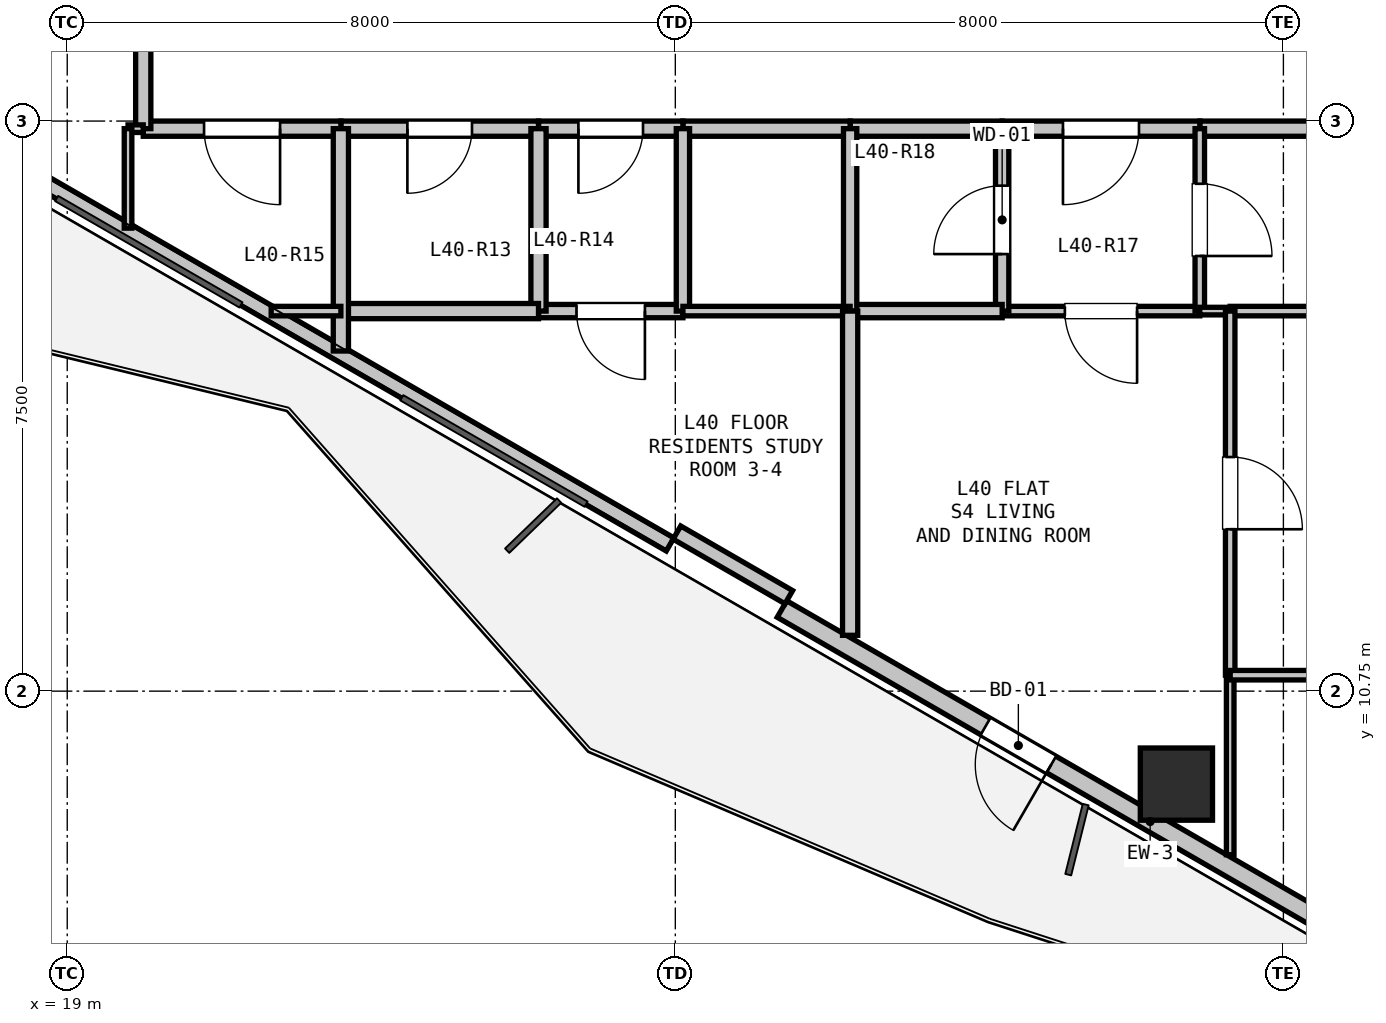
"""IFC4 building model, lengths in metres.
Left out: names, types, materials, properties, quantities, classifications, styles, units other than length and angle.
Written with IfcOpenShell. Run it as: python <this file> out.ifc"""

import sys

from ifc_helpers import new_model, si_unit, direction, frame, frame_2d, origin, origin_2d, place, context, subcontext, project, spatial, rectangle, hollow_rectangle, extrude, element, fill, save


model = new_model("IFC4")
c1 = context("Model", 3, precision=1e-05, world=origin(), true_north=direction((0.0, 1.0)))
c2 = subcontext(c1, "Body", "Model", "MODEL_VIEW")
j1 = project(units=[si_unit("LENGTHUNIT", "METRE"), si_unit("PLANEANGLEUNIT", "RADIAN")], contexts=[c1])
p1 = place(None, origin())
s1 = spatial("IfcSite", under=j1, at=p1, CompositionType="ELEMENT")
p2 = place(p1, origin())
s2 = spatial("IfcBuilding", under=s1, at=p2, CompositionType="ELEMENT")
p3 = place(p2, frame((0.0, 0.0, 144.3)))
s3 = spatial("IfcBuildingStorey", under=s2, at=p3, CompositionType="ELEMENT", Elevation=144.3)
p4 = place(p3, frame((33.593, 9.527, 0.0), z_axis=(0.0, 0.0, 1.0), x_axis=(1.0, 0.0, 0.0)))
e1 = element("IfcColumn", 1, at=p4, inside=s3, PredefinedType="COLUMN", context=c2, shape_type="SweptSolid", body=[
    extrude(hollow_rectangle(XDim=0.95, YDim=0.95, WallThickness=0.028, at=origin_2d()), origin(), (0.0, 0.0, 1.0), 3.3),
])
p5 = place(p3, frame((38.091, 6.237, 0.0), z_axis=(0.0, 0.0, 1.0), x_axis=(-0.86602239209, 0.500005216371, 0.0)))
e2 = element("IfcWall", 2, at=p5, inside=s3, PredefinedType="SOLIDWALL", context=c2, shape_type="SweptSolid", body=[
    extrude(rectangle(XDim=11.186, YDim=0.25, at=frame_2d((5.593, 0.0))), origin(), (0.0, 0.0, 1.0), 2.68),
])
p6 = place(p5, frame((7.095, 0.0, 0.0)))
e3 = element("IfcOpeningElement", 3, at=p6, cuts=e2, PredefinedType="OPENING", context=c2, shape_type="SweptSolid", body=[
    extrude(rectangle(XDim=1.0, YDim=2.1, at=frame_2d((0.5, 1.05))), frame((0.0, 0.135, 0.0), z_axis=(0.0, -1.0, 0.0), x_axis=(1.0, 0.0, 0.0)), (0.0, 0.0, 1.0), 0.27),
])
p7 = place(p5, frame((1.718, 0.0, 0.9)))
e4 = element("IfcOpeningElement", 4, at=p7, cuts=e2, PredefinedType="OPENING", context=c2, shape_type="SweptSolid", body=[
    extrude(rectangle(XDim=1.2, YDim=1.4, at=frame_2d((0.6, 0.7))), frame((0.0, 0.135, 0.0), z_axis=(0.0, -1.0, 0.0), x_axis=(1.0, 0.0, 0.0)), (0.0, 0.0, 1.0), 0.27),
])
p8 = place(p3, frame((26.931, 12.68, 0.0), z_axis=(0.0, 0.0, 1.0), x_axis=(-0.866026619769, 0.499997893847, 0.0)))
e5 = element("IfcWall", 5, at=p8, inside=s3, PredefinedType="PARAPET", context=c2, shape_type="SweptSolid", body=[
    extrude(rectangle(XDim=10.486, YDim=0.2, at=frame_2d((5.243, 0.0))), origin(), (0.0, 0.0, 1.0), 0.2),
])
p9 = place(p3, frame((28.493, 11.986, 0.0), z_axis=(0.0, 0.0, 1.0), x_axis=(-0.86605165483, 0.499954529098, 0.0)))
e6 = element("IfcWall", 6, at=p9, inside=s3, PredefinedType="PARAPET", context=c2, shape_type="SweptSolid", body=[
    extrude(rectangle(XDim=1.7, YDim=0.2, at=frame_2d((0.85, 0.0))), origin(), (0.0, 0.0, 1.0), 2.68),
])
p10 = place(p3, frame((39.2, 18.15, 0.0), z_axis=(0.0, 0.0, 1.0), x_axis=(-1.0, 0.0, 0.0)))
e7 = element("IfcWall", 7, at=p10, inside=s3, PredefinedType="PARTITIONING", context=c2, shape_type="SweptSolid", body=[
    extrude(rectangle(XDim=5.3, YDim=0.2, at=frame_2d((2.65, 0.0))), origin(), (0.0, 0.0, 1.0), 2.433),
])
p11 = place(p3, frame((33.9, 18.15, 0.0), z_axis=(0.0, 0.0, 1.0), x_axis=(-1.0, 0.0, 0.0)))
e8 = element("IfcWall", 8, at=p11, inside=s3, PredefinedType="PARTITIONING", context=c2, shape_type="SweptSolid", body=[
    extrude(rectangle(XDim=2.6, YDim=0.2, at=frame_2d((1.3, 0.0))), origin(), (0.0, 0.0, 1.0), 3.06),
])
p12 = place(p11, frame((0.8, 0.0, 0.0)))
e9 = element("IfcOpeningElement", 9, at=p12, cuts=e8, PredefinedType="OPENING", context=c2, shape_type="SweptSolid", body=[
    extrude(rectangle(XDim=1.0, YDim=2.15, at=frame_2d((0.5, 1.075))), frame((0.0, 0.11, 0.0), z_axis=(0.0, -1.0, 0.0), x_axis=(1.0, 0.0, 0.0)), (0.0, 0.0, 1.0), 0.22),
])
p13 = place(p3, frame((31.3, 18.15, 0.0), z_axis=(0.0, 0.0, 1.0), x_axis=(-1.0, 0.0, 0.0)))
e10 = element("IfcWall", 10, at=p13, inside=s3, PredefinedType="PARTITIONING", context=c2, shape_type="SweptSolid", body=[
    extrude(rectangle(XDim=2.0, YDim=0.2, at=frame_2d((1.0, 0.0))), origin(), (0.0, 0.0, 1.0), 3.06),
])
p14 = place(p3, frame((29.3, 18.15, 0.0), z_axis=(0.0, 0.0, 1.0), x_axis=(-1.0, 0.0, 0.0)))
e11 = element("IfcWall", 11, at=p14, inside=s3, PredefinedType="PARTITIONING", context=c2, shape_type="SweptSolid", body=[
    extrude(rectangle(XDim=2.2, YDim=0.2, at=frame_2d((1.1, 0.0))), origin(), (0.0, 0.0, 1.0), 3.06),
])
p15 = place(p3, frame((27.1, 18.15, 0.0), z_axis=(0.0, 0.0, 1.0), x_axis=(-1.0, 0.0, 0.0)))
e12 = element("IfcWall", 12, at=p15, inside=s3, PredefinedType="PARTITIONING", context=c2, shape_type="SweptSolid", body=[
    extrude(rectangle(XDim=1.9, YDim=0.2, at=frame_2d((0.95, 0.0))), origin(), (0.0, 0.0, 1.0), 3.06),
])
p16 = place(p15, frame((0.525, 0.0, 0.0)))
e13 = element("IfcOpeningElement", 13, at=p16, cuts=e12, PredefinedType="OPENING", context=c2, shape_type="SweptSolid", body=[
    extrude(rectangle(XDim=0.85, YDim=2.1, at=frame_2d((0.425, 1.05))), frame((0.0, 0.11, 0.0), z_axis=(0.0, -1.0, 0.0), x_axis=(1.0, 0.0, 0.0)), (0.0, 0.0, 1.0), 0.22),
])
p17 = place(p3, frame((25.2, 18.15, 0.0), z_axis=(0.0, 0.0, 1.0), x_axis=(-1.0, 0.0, 0.0)))
e14 = element("IfcWall", 14, at=p17, inside=s3, PredefinedType="PARTITIONING", context=c2, shape_type="SweptSolid", body=[
    extrude(rectangle(XDim=2.6, YDim=0.2, at=frame_2d((1.3, 0.0))), origin(), (0.0, 0.0, 1.0), 2.433),
])
p18 = place(p17, frame((0.875, 0.0, 0.0)))
e15 = element("IfcOpeningElement", 15, at=p18, cuts=e14, PredefinedType="OPENING", context=c2, shape_type="SweptSolid", body=[
    extrude(rectangle(XDim=0.85, YDim=2.1, at=frame_2d((0.425, 1.05))), frame((0.0, 0.11, 0.0), z_axis=(0.0, -1.0, 0.0), x_axis=(1.0, 0.0, 0.0)), (0.0, 0.0, 1.0), 0.22),
])
p19 = place(p3, frame((22.6, 18.15, 0.0), z_axis=(0.0, 0.0, 1.0), x_axis=(-1.0, 0.0, 0.0)))
e16 = element("IfcWall", 16, at=p19, inside=s3, PredefinedType="PARTITIONING", context=c2, shape_type="SweptSolid", body=[
    extrude(rectangle(XDim=2.6, YDim=0.2, at=frame_2d((1.3, 0.0))), origin(), (0.0, 0.0, 1.0), 3.06),
])
p20 = place(p19, frame((0.8, 0.0, 0.0)))
e17 = element("IfcOpeningElement", 17, at=p20, cuts=e16, PredefinedType="OPENING", context=c2, shape_type="SweptSolid", body=[
    extrude(rectangle(XDim=1.0, YDim=2.15, at=frame_2d((0.5, 1.075))), frame((0.0, 0.11, 0.0), z_axis=(0.0, -1.0, 0.0), x_axis=(1.0, 0.0, 0.0)), (0.0, 0.0, 1.0), 0.22),
])
p21 = place(p3, frame((20.0, 18.15, 0.0), z_axis=(0.0, 0.0, 1.0), x_axis=(0.0, 1.0, 0.0)))
e18 = element("IfcWall", 18, at=p21, inside=s3, PredefinedType="PARTITIONING", context=c2, shape_type="SweptSolid", body=[
    extrude(rectangle(XDim=2.6, YDim=0.2, at=frame_2d((1.3, 0.0))), origin(), (0.0, 0.0, 1.0), 3.06),
])
p22 = place(p3, frame((33.9, 15.75, 0.0), z_axis=(0.0, 0.0, 1.0), x_axis=(-1.0, 0.0, 0.0)))
e19 = element("IfcWall", 19, at=p22, inside=s3, PredefinedType="PARTITIONING", context=c2, shape_type="SweptSolid", body=[
    extrude(rectangle(XDim=2.6, YDim=0.125, at=frame_2d((1.3, 0.0))), origin(), (0.0, 0.0, 1.0), 3.06),
])
p23 = place(p22, frame((0.825, 0.0, 0.0)))
e20 = element("IfcOpeningElement", 20, at=p23, cuts=e19, PredefinedType="OPENING", context=c2, shape_type="SweptSolid", body=[
    extrude(rectangle(XDim=0.95, YDim=2.1, at=frame_2d((0.475, 1.05))), frame((0.0, 0.073, 0.0), z_axis=(0.0, -1.0, 0.0), x_axis=(1.0, 0.0, 0.0)), (0.0, 0.0, 1.0), 0.145),
])
p24 = place(p3, frame((31.3, 15.75, 0.0), z_axis=(0.0, 0.0, 1.0), x_axis=(0.0, 1.0, 0.0)))
e21 = element("IfcWall", 21, at=p24, inside=s3, PredefinedType="PLUMBINGWALL", context=c2, shape_type="SweptSolid", body=[
    extrude(rectangle(XDim=2.4, YDim=0.175, at=frame_2d((1.2, 0.0))), origin(), (0.0, 0.0, 1.0), 3.06),
])
p25 = place(p24, frame((0.75, 0.0, 0.0)))
e22 = element("IfcOpeningElement", 22, at=p25, cuts=e21, PredefinedType="OPENING", context=c2, shape_type="SweptSolid", body=[
    extrude(rectangle(XDim=0.9, YDim=2.1, at=frame_2d((0.45, 1.05))), frame((0.0, 0.097, 0.0), z_axis=(0.0, -1.0, 0.0), x_axis=(1.0, 0.0, 0.0)), (0.0, 0.0, 1.0), 0.195),
])
p26 = place(p3, frame((33.9, 18.15, 0.0), z_axis=(0.0, 0.0, 1.0), x_axis=(0.0, -1.0, 0.0)))
e23 = element("IfcWall", 23, at=p26, inside=s3, PredefinedType="PARTITIONING", context=c2, shape_type="SweptSolid", body=[
    extrude(rectangle(XDim=2.4, YDim=0.125, at=frame_2d((1.2, 0.0))), origin(), (0.0, 0.0, 1.0), 3.06),
])
p27 = place(p26, frame((0.725, 0.0, 0.0)))
e24 = element("IfcOpeningElement", 24, at=p27, cuts=e23, PredefinedType="OPENING", context=c2, shape_type="SweptSolid", body=[
    extrude(rectangle(XDim=0.95, YDim=2.1, at=frame_2d((0.475, 1.05))), frame((0.0, 0.073, 0.0), z_axis=(0.0, -1.0, 0.0), x_axis=(1.0, 0.0, 0.0)), (0.0, 0.0, 1.0), 0.145),
])
p28 = place(p3, frame((27.1, 15.75, 0.0), z_axis=(0.0, 0.0, 1.0), x_axis=(-1.0, 0.0, 0.0)))
e25 = element("IfcWall", 25, at=p28, inside=s3, PredefinedType="PLUMBINGWALL", context=c2, shape_type="SweptSolid", body=[
    extrude(rectangle(XDim=1.9, YDim=0.175, at=frame_2d((0.95, 0.0))), origin(), (0.0, 0.0, 1.0), 2.433),
])
p29 = place(p28, frame((0.5, 0.0, 0.0)))
e26 = element("IfcOpeningElement", 26, at=p29, cuts=e25, PredefinedType="OPENING", context=c2, shape_type="SweptSolid", body=[
    extrude(rectangle(XDim=0.9, YDim=2.1, at=frame_2d((0.45, 1.05))), frame((0.0, 0.097, 0.0), z_axis=(0.0, -1.0, 0.0), x_axis=(1.0, 0.0, 0.0)), (0.0, 0.0, 1.0), 0.195),
])
p30 = place(p3, frame((25.2, 15.75, 0.0), z_axis=(0.0, 0.0, 1.0), x_axis=(0.0, 1.0, 0.0)))
e27 = element("IfcWall", 27, at=p30, inside=s3, PredefinedType="PARTITIONING", context=c2, shape_type="SweptSolid", body=[
    extrude(rectangle(XDim=2.4, YDim=0.2, at=frame_2d((1.2, 0.0))), origin(), (0.0, 0.0, 1.0), 2.433),
])
p31 = place(p3, frame((27.1, 18.15, 0.0), z_axis=(0.0, 0.0, 1.0), x_axis=(0.0, -1.0, 0.0)))
e28 = element("IfcWall", 28, at=p31, inside=s3, PredefinedType="PLUMBINGWALL", context=c2, shape_type="SweptSolid", body=[
    extrude(rectangle(XDim=2.4, YDim=0.175, at=frame_2d((1.2, 0.0))), origin(), (0.0, 0.0, 1.0), 2.433),
])
p32 = place(p3, frame((31.3, 15.75, 0.0), z_axis=(0.0, 0.0, 1.0), x_axis=(-1.0, 0.0, 0.0)))
e29 = element("IfcWall", 29, at=p32, inside=s3, PredefinedType="PLUMBINGWALL", context=c2, shape_type="SweptSolid", body=[
    extrude(rectangle(XDim=2.0, YDim=0.175, at=frame_2d((1.0, 0.0))), origin(), (0.0, 0.0, 1.0), 3.06),
])
p33 = place(p3, frame((29.3, 15.75, 0.0), z_axis=(0.0, 0.0, 1.0), x_axis=(0.0, 1.0, 0.0)))
e30 = element("IfcWall", 30, at=p33, inside=s3, PredefinedType="PLUMBINGWALL", context=c2, shape_type="SweptSolid", body=[
    extrude(rectangle(XDim=2.4, YDim=0.175, at=frame_2d((1.2, 0.0))), origin(), (0.0, 0.0, 1.0), 3.06),
])
p34 = place(p3, frame((42.07, 15.75, 0.0), z_axis=(0.0, 0.0, 1.0), x_axis=(-1.0, 0.0, 0.0)))
e31 = element("IfcWall", 31, at=p34, inside=s3, PredefinedType="PARTITIONING", context=c2, shape_type="SweptSolid", body=[
    extrude(rectangle(XDim=7.77, YDim=0.125, at=frame_2d((3.885, 0.0))), origin(), (0.0, 0.0, 1.0), 2.365),
])
p35 = place(p34, frame((3.41, 0.0, 0.0)))
e32 = element("IfcOpeningElement", 32, at=p35, cuts=e31, PredefinedType="OPENING", context=c2, shape_type="SweptSolid", body=[
    extrude(rectangle(XDim=0.95, YDim=2.1, at=frame_2d((0.475, 1.05))), frame((0.0, 0.073, 0.0), z_axis=(0.0, -1.0, 0.0), x_axis=(1.0, 0.0, 0.0)), (0.0, 0.0, 1.0), 0.145),
])
p36 = place(p3, frame((34.3, 15.75, 0.0), z_axis=(0.0, 0.0, 1.0), x_axis=(-1.0, 0.0, 0.0)))
e33 = element("IfcWall", 33, at=p36, inside=s3, PredefinedType="PARTITIONING", context=c2, shape_type="SweptSolid", body=[
    extrude(rectangle(XDim=0.4, YDim=0.1, at=frame_2d((0.2, 0.0))), origin(), (0.0, 0.0, 1.0), 3.06),
])
p37 = place(p3, frame((25.2, 15.75, 0.0), z_axis=(0.0, 0.0, 1.0), x_axis=(-1.0, 0.0, 0.0)))
e34 = element("IfcWall", 34, at=p37, inside=s3, PredefinedType="PARTITIONING", context=c2, shape_type="SweptSolid", body=[
    extrude(rectangle(XDim=2.6, YDim=0.2, at=frame_2d((1.3, 0.0))), origin(), (0.0, 0.0, 1.0), 2.365),
])
p38 = place(p3, frame((22.6, 15.225, 0.0), z_axis=(0.0, 0.0, 1.0), x_axis=(0.0, 1.0, 0.0)))
e35 = element("IfcWall", 35, at=p38, inside=s3, PredefinedType="PARTITIONING", context=c2, shape_type="SweptSolid", body=[
    extrude(rectangle(XDim=2.925, YDim=0.2, at=frame_2d((1.463, 0.0))), origin(), (0.0, 0.0, 1.0), 2.365),
])
p39 = place(p3, frame((19.8, 18.15, 0.0), z_axis=(0.0, 0.0, 1.0), x_axis=(1.0, 0.0, 0.0)))
e36 = element("IfcWall", 36, at=p39, inside=s3, PredefinedType="PARTITIONING", context=c2, shape_type="SweptSolid", body=[
    extrude(rectangle(XDim=0.2, YDim=0.1, at=frame_2d((0.1, 0.0))), origin(), (0.0, 0.0, 1.0), 3.06),
])
p40 = place(p3, frame((22.6, 15.75, 0.0), z_axis=(0.0, 0.0, 1.0), x_axis=(-1.0, 0.0, 0.0)))
e37 = element("IfcWall", 37, at=p40, inside=s3, PredefinedType="PARTITIONING", context=c2, shape_type="SweptSolid", body=[
    extrude(rectangle(XDim=0.917, YDim=0.125, at=frame_2d((0.458, 0.0))), origin(), (0.0, 0.0, 1.0), 2.365),
])
p41 = place(p3, frame((19.8, 16.841, 0.0), z_axis=(0.0, 0.0, 1.0), x_axis=(0.0, 1.0, 0.0)))
e38 = element("IfcWall", 38, at=p41, inside=s3, PredefinedType="PARTITIONING", context=c2, shape_type="SweptSolid", body=[
    extrude(rectangle(XDim=1.309, YDim=0.1, at=frame_2d((0.654, 0.0))), origin(), (0.0, 0.0, 1.0), 2.365),
])
p42 = place(p3, frame((27.1, 15.75, 0.0), z_axis=(0.0, 0.0, 1.0), x_axis=(1.0, 0.0, 0.0)))
e39 = element("IfcWall", 39, at=p42, inside=s3, PredefinedType="PARTITIONING", context=c2, shape_type="SweptSolid", body=[
    extrude(rectangle(XDim=2.2, YDim=0.125, at=frame_2d((1.1, 0.0))), origin(), (0.0, 0.0, 1.0), 2.433),
])
p43 = place(p3, frame((29.3, 15.75, 0.0), z_axis=(0.0, 0.0, 1.0), x_axis=(0.0, -1.0, 0.0)))
e40 = element("IfcWall", 40, at=p43, inside=s3, PredefinedType="PARTITIONING", context=c2, shape_type="SweptSolid", body=[
    extrude(rectangle(XDim=4.265, YDim=0.2, at=frame_2d((2.133, 0.0))), origin(), (0.0, 0.0, 1.0), 2.365),
])
p44 = place(p3, frame((34.3, 15.75, 0.0), z_axis=(0.0, 0.0, 1.0), x_axis=(0.0, -1.0, 0.0)))
e41 = element("IfcWall", 41, at=p44, inside=s3, PredefinedType="PARTITIONING", context=c2, shape_type="SweptSolid", body=[
    extrude(rectangle(XDim=4.79, YDim=0.125, at=frame_2d((2.395, 0.0))), origin(), (0.0, 0.0, 1.0), 3.06),
])
p45 = place(p44, frame((1.92, 0.0, 0.0)))
e42 = element("IfcOpeningElement", 42, at=p45, cuts=e41, PredefinedType="OPENING", context=c2, shape_type="SweptSolid", body=[
    extrude(rectangle(XDim=0.95, YDim=2.1, at=frame_2d((0.475, 1.05))), frame((0.0, 0.073, 0.0), z_axis=(0.0, -1.0, 0.0), x_axis=(1.0, 0.0, 0.0)), (0.0, 0.0, 1.0), 0.145),
])
p46 = place(p3, frame((34.3, 10.96, 0.0), z_axis=(0.0, 0.0, 1.0), x_axis=(0.0, -1.0, 0.0)))
e43 = element("IfcWall", 43, at=p46, inside=s3, PredefinedType="PARTITIONING", context=c2, shape_type="SweptSolid", body=[
    extrude(rectangle(XDim=2.362, YDim=0.1, at=frame_2d((1.181, 0.0))), origin(), (0.0, 0.0, 1.0), 2.724),
])
p47 = place(p3, frame((34.3, 10.96, 0.0), z_axis=(0.0, 0.0, 1.0), x_axis=(1.0, 0.0, 0.0)))
e44 = element("IfcWall", 44, at=p47, inside=s3, PredefinedType="PARTITIONING", context=c2, shape_type="SweptSolid", body=[
    extrude(rectangle(XDim=7.77, YDim=0.125, at=frame_2d((3.885, 0.0))), origin(), (0.0, 0.0, 1.0), 2.433),
])
p48 = place(p47, frame((3.41, 0.0, 0.0)))
e45 = element("IfcOpeningElement", 45, at=p48, cuts=e44, PredefinedType="OPENING", context=c2, shape_type="SweptSolid", body=[
    extrude(rectangle(XDim=0.95, YDim=2.1, at=frame_2d((0.475, 1.05))), frame((0.0, 0.073, 0.0), z_axis=(0.0, -1.0, 0.0), x_axis=(1.0, 0.0, 0.0)), (0.0, 0.0, 1.0), 0.145),
])
p49 = place(p6, origin())
e46 = element("IfcDoor", 46, at=p49, inside=s3, OperationType="SINGLE_SWING_LEFT", PredefinedType="DOOR", context=c2, shape_type="SweptSolid", body=[
    extrude(rectangle(XDim=1.0, YDim=2.1, at=frame_2d((0.5, 1.05))), frame((0.0, 0.025, 0.0), z_axis=(0.0, -1.0, 0.0), x_axis=(1.0, 0.0, 0.0)), (0.0, 0.0, 1.0), 0.05),
])
fill(e3, e46)
p50 = place(p12, origin())
e47 = element("IfcDoor", 47, at=p50, inside=s3, OperationType="SINGLE_SWING_RIGHT", PredefinedType="DOOR", context=c2, shape_type="SweptSolid", body=[
    extrude(rectangle(XDim=1.0, YDim=2.15, at=frame_2d((0.5, 1.075))), frame((0.0, 0.025, 0.0), z_axis=(0.0, -1.0, 0.0), x_axis=(1.0, 0.0, 0.0)), (0.0, 0.0, 1.0), 0.05),
])
fill(e9, e47)
p51 = place(p16, origin())
e48 = element("IfcDoor", 48, at=p51, inside=s3, OperationType="SINGLE_SWING_RIGHT", PredefinedType="DOOR", context=c2, shape_type="SweptSolid", body=[
    extrude(rectangle(XDim=0.85, YDim=2.1, at=frame_2d((0.425, 1.05))), frame((0.0, 0.025, 0.0), z_axis=(0.0, -1.0, 0.0), x_axis=(1.0, 0.0, 0.0)), (0.0, 0.0, 1.0), 0.05),
])
fill(e13, e48)
p52 = place(p18, origin())
e49 = element("IfcDoor", 49, at=p52, inside=s3, OperationType="SINGLE_SWING_RIGHT", PredefinedType="DOOR", context=c2, shape_type="SweptSolid", body=[
    extrude(rectangle(XDim=0.85, YDim=2.1, at=frame_2d((0.425, 1.05))), frame((0.0, 0.025, 0.0), z_axis=(0.0, -1.0, 0.0), x_axis=(1.0, 0.0, 0.0)), (0.0, 0.0, 1.0), 0.05),
])
fill(e15, e49)
p53 = place(p20, origin())
e50 = element("IfcDoor", 50, at=p53, inside=s3, OperationType="SINGLE_SWING_LEFT", PredefinedType="DOOR", context=c2, shape_type="SweptSolid", body=[
    extrude(rectangle(XDim=1.0, YDim=2.15, at=frame_2d((0.5, 1.075))), frame((0.0, 0.025, 0.0), z_axis=(0.0, -1.0, 0.0), x_axis=(1.0, 0.0, 0.0)), (0.0, 0.0, 1.0), 0.05),
])
fill(e17, e50)
p54 = place(p25, origin())
e51 = element("IfcDoor", 51, at=p54, inside=s3, OperationType="SINGLE_SWING_LEFT", PredefinedType="DOOR", context=c2, shape_type="SweptSolid", body=[
    extrude(rectangle(XDim=0.9, YDim=2.1, at=frame_2d((0.45, 1.05))), frame((0.0, 0.025, 0.0), z_axis=(0.0, -1.0, 0.0), x_axis=(1.0, 0.0, 0.0)), (0.0, 0.0, 1.0), 0.05),
])
fill(e22, e51)
p55 = place(p27, origin())
e52 = element("IfcDoor", 52, at=p55, inside=s3, OperationType="SINGLE_SWING_RIGHT", PredefinedType="DOOR", context=c2, shape_type="SweptSolid", body=[
    extrude(rectangle(XDim=0.95, YDim=2.1, at=frame_2d((0.475, 1.05))), frame((0.0, 0.025, 0.0), z_axis=(0.0, -1.0, 0.0), x_axis=(1.0, 0.0, 0.0)), (0.0, 0.0, 1.0), 0.05),
])
fill(e24, e52)
p56 = place(p23, origin())
e53 = element("IfcDoor", 53, at=p56, inside=s3, OperationType="SINGLE_SWING_LEFT", PredefinedType="DOOR", context=c2, shape_type="SweptSolid", body=[
    extrude(rectangle(XDim=0.95, YDim=2.1, at=frame_2d((0.475, 1.05))), frame((0.0, 0.025, 0.0), z_axis=(0.0, -1.0, 0.0), x_axis=(1.0, 0.0, 0.0)), (0.0, 0.0, 1.0), 0.05),
])
fill(e20, e53)
p57 = place(p45, origin())
e54 = element("IfcDoor", 54, at=p57, inside=s3, OperationType="SINGLE_SWING_RIGHT", PredefinedType="DOOR", context=c2, shape_type="SweptSolid", body=[
    extrude(rectangle(XDim=0.95, YDim=2.1, at=frame_2d((0.475, 1.05))), frame((0.0, 0.025, 0.0), z_axis=(0.0, -1.0, 0.0), x_axis=(1.0, 0.0, 0.0)), (0.0, 0.0, 1.0), 0.05),
])
fill(e42, e54)
p58 = place(p29, origin())
e55 = element("IfcDoor", 55, at=p58, inside=s3, OperationType="SINGLE_SWING_LEFT", PredefinedType="DOOR", context=c2, shape_type="SweptSolid", body=[
    extrude(rectangle(XDim=0.9, YDim=2.1, at=frame_2d((0.45, 1.05))), frame((0.0, 0.025, 0.0), z_axis=(0.0, -1.0, 0.0), x_axis=(1.0, 0.0, 0.0)), (0.0, 0.0, 1.0), 0.05),
])
fill(e26, e55)
save(model, sys.argv[1])
